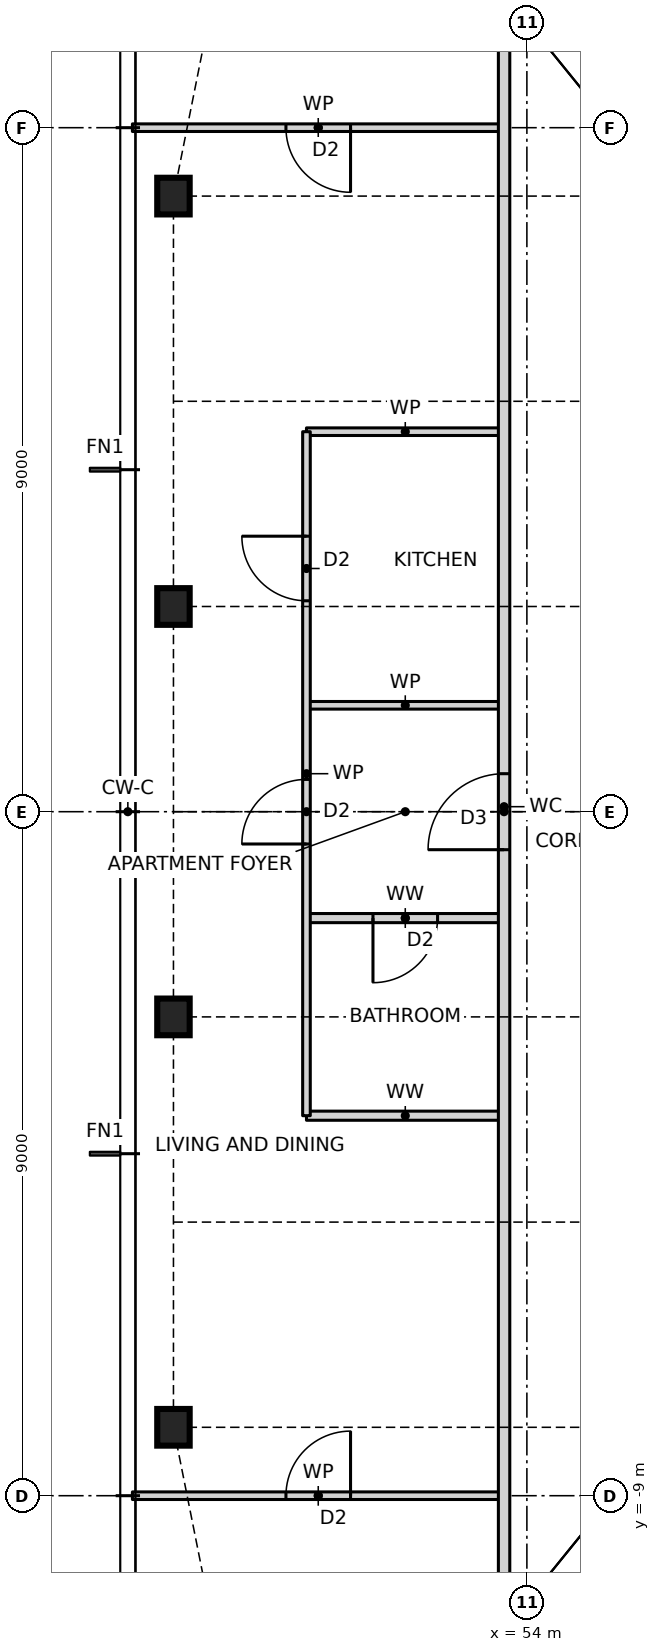
"""IFC4 building model, lengths in metres.
Left out: names, types, materials, properties, quantities, classifications, styles, units other than length and angle.
Written with IfcOpenShell. Run it as: python <this file> out.ifc"""

import sys

from ifc_helpers import new_model, si_unit, direction, frame, frame_2d, origin, origin_2d, place, context, subcontext, project, spatial, rectangle, i_section, extrude, element, fill, save


model = new_model("IFC4")
c1 = context("Model", 3, precision=1e-05, world=origin(), true_north=direction((0.0, 1.0)))
c2 = subcontext(c1, "Body", "Model", "MODEL_VIEW")
j1 = project(units=[si_unit("LENGTHUNIT", "METRE"), si_unit("PLANEANGLEUNIT", "RADIAN")], contexts=[c1])
p1 = place(None, origin())
s1 = spatial("IfcSite", under=j1, at=p1, CompositionType="ELEMENT")
p2 = place(p1, origin())
s2 = spatial("IfcBuilding", under=s1, at=p2, CompositionType="ELEMENT")
p3 = place(p2, frame((0.0, 0.0, 105.0)))
s3 = spatial("IfcBuildingStorey", under=s2, at=p3, CompositionType="ELEMENT", Elevation=105.0)
for number, where, z_axis, x_axis in (
    (1, (49.35, 8.1, 0.0), (0.0, 0.0, 1.0), (1.0, 0.0, 0.0)),
    (2, (49.35, 2.7, 0.0), (0.0, 0.0, 1.0), (1.0, 0.0, 0.0)),
    (3, (49.35, -2.7, 0.0), (0.0, 0.0, 1.0), (1.0, 0.0, 0.0)),
    (4, (49.35, -8.1, 0.0), (0.0, 0.0, 1.0), (1.0, 0.0, 0.0)),
):
    element("IfcColumn", number, at=place(p3, frame(where, z_axis=z_axis, x_axis=x_axis)), inside=s3, PredefinedType="COLUMN", context=c2, shape_type="SweptSolid", body=[
        extrude(i_section(OverallWidth=0.427, OverallDepth=0.483, WebThickness=0.051, FlangeThickness=0.082, at=origin_2d()), origin(), (0.0, 0.0, 1.0), 3.5),
    ])
p4 = place(p3, frame((48.81, -9.0, 0.0), z_axis=(0.0, 0.0, 1.0), x_axis=(1.0, 0.0, 0.0)))
e5 = element("IfcWall", 5, at=p4, inside=s3, PredefinedType="PARTITIONING", context=c2, shape_type="SweptSolid", body=[
    extrude(rectangle(XDim=4.89, YDim=0.1, at=frame_2d((2.445, 0.0))), origin(), (0.0, 0.0, 1.0), 3.27),
])
p5 = place(p4, frame((2.02, 0.0, 0.0)))
e6 = element("IfcOpeningElement", 6, at=p5, cuts=e5, PredefinedType="OPENING", context=c2, shape_type="SweptSolid", body=[
    extrude(rectangle(XDim=0.85, YDim=2.1, at=frame_2d((0.425, 1.05))), frame((0.0, 0.06, 0.0), z_axis=(0.0, -1.0, 0.0), x_axis=(1.0, 0.0, 0.0)), (0.0, 0.0, 1.0), 0.12),
])
p6 = place(p3, frame((51.1, -4.0, 0.0), z_axis=(0.0, 0.0, 1.0), x_axis=(1.0, 0.0, 0.0)))
e7 = element("IfcWall", 7, at=p6, inside=s3, PredefinedType="PARTITIONING", context=c2, shape_type="SweptSolid", body=[
    extrude(rectangle(XDim=2.6, YDim=0.12, at=frame_2d((1.3, 0.0))), origin(), (0.0, 0.0, 1.0), 3.27),
])
p7 = place(p3, frame((51.1, -1.4, 0.0), z_axis=(0.0, 0.0, 1.0), x_axis=(1.0, 0.0, 0.0)))
e8 = element("IfcWall", 8, at=p7, inside=s3, PredefinedType="PARTITIONING", context=c2, shape_type="SweptSolid", body=[
    extrude(rectangle(XDim=2.6, YDim=0.12, at=frame_2d((1.3, 0.0))), origin(), (0.0, 0.0, 1.0), 3.27),
])
p8 = place(p7, frame((0.875, 0.0, 0.0)))
e9 = element("IfcOpeningElement", 9, at=p8, cuts=e8, PredefinedType="OPENING", context=c2, shape_type="SweptSolid", body=[
    extrude(rectangle(XDim=0.85, YDim=2.1, at=frame_2d((0.425, 1.05))), frame((0.0, 0.07, 0.0), z_axis=(0.0, -1.0, 0.0), x_axis=(1.0, 0.0, 0.0)), (0.0, 0.0, 1.0), 0.14),
])
for number, where, z_axis, x_axis in (
    (10, (51.1, 1.4, 0.0), (0.0, 0.0, 1.0), (1.0, 0.0, 0.0)),
    (11, (51.1, 5.0, 0.0), (0.0, 0.0, 1.0), (1.0, 0.0, 0.0)),
):
    element("IfcWall", number, at=place(p3, frame(where, z_axis=z_axis, x_axis=x_axis)), inside=s3, PredefinedType="PARTITIONING", context=c2, shape_type="SweptSolid", body=[
        extrude(rectangle(XDim=2.6, YDim=0.1, at=frame_2d((1.3, 0.0))), origin(), (0.0, 0.0, 1.0), 3.27),
    ])
p9 = place(p3, frame((48.81, 9.0, 0.0), z_axis=(0.0, 0.0, 1.0), x_axis=(1.0, 0.0, 0.0)))
e12 = element("IfcWall", 12, at=p9, inside=s3, PredefinedType="PARTITIONING", context=c2, shape_type="SweptSolid", body=[
    extrude(rectangle(XDim=4.89, YDim=0.1, at=frame_2d((2.445, 0.0))), origin(), (0.0, 0.0, 1.0), 3.27),
])
p10 = place(p9, frame((2.02, 0.0, 0.0)))
e13 = element("IfcOpeningElement", 13, at=p10, cuts=e12, PredefinedType="OPENING", context=c2, shape_type="SweptSolid", body=[
    extrude(rectangle(XDim=0.85, YDim=2.1, at=frame_2d((0.425, 1.05))), frame((0.0, 0.06, 0.0), z_axis=(0.0, -1.0, 0.0), x_axis=(1.0, 0.0, 0.0)), (0.0, 0.0, 1.0), 0.12),
])
p11 = place(p3, frame((53.7, -10.768, 0.0), z_axis=(0.0, 0.0, 1.0), x_axis=(0.0, 1.0, 0.0)))
e14 = element("IfcWall", 14, at=p11, inside=s3, PredefinedType="PARTITIONING", context=c2, shape_type="SweptSolid", body=[
    extrude(rectangle(XDim=21.668, YDim=0.15, at=frame_2d((10.834, 0.0))), origin(), (0.0, 0.0, 1.0), 3.27),
])
p12 = place(p11, frame((10.268, 0.0, 0.0)))
e15 = element("IfcOpeningElement", 15, at=p12, cuts=e14, PredefinedType="OPENING", context=c2, shape_type="SweptSolid", body=[
    extrude(rectangle(XDim=1.0, YDim=2.1, at=frame_2d((0.5, 1.05))), frame((0.0, 0.085, 0.0), z_axis=(0.0, -1.0, 0.0), x_axis=(1.0, 0.0, 0.0)), (0.0, 0.0, 1.0), 0.17),
])
p13 = place(p3, frame((51.1, -4.0, 0.0), z_axis=(0.0, 0.0, 1.0), x_axis=(0.0, 1.0, 0.0)))
e16 = element("IfcWall", 16, at=p13, inside=s3, PredefinedType="PARTITIONING", context=c2, shape_type="SweptSolid", body=[
    extrude(rectangle(XDim=9.0, YDim=0.1, at=frame_2d((4.5, 0.0))), origin(), (0.0, 0.0, 1.0), 3.27),
])
p14 = place(p13, frame((6.775, 0.0, 0.0)))
e17 = element("IfcOpeningElement", 17, at=p14, cuts=e16, PredefinedType="OPENING", context=c2, shape_type="SweptSolid", body=[
    extrude(rectangle(XDim=0.85, YDim=2.1, at=frame_2d((0.425, 1.05))), frame((0.0, 0.06, 0.0), z_axis=(0.0, -1.0, 0.0), x_axis=(1.0, 0.0, 0.0)), (0.0, 0.0, 1.0), 0.12),
])
p15 = place(p13, frame((3.575, 0.0, 0.0)))
e18 = element("IfcOpeningElement", 18, at=p15, cuts=e16, PredefinedType="OPENING", context=c2, shape_type="SweptSolid", body=[
    extrude(rectangle(XDim=0.85, YDim=2.1, at=frame_2d((0.425, 1.05))), frame((0.0, 0.06, 0.0), z_axis=(0.0, -1.0, 0.0), x_axis=(1.0, 0.0, 0.0)), (0.0, 0.0, 1.0), 0.12),
])
p16 = place(p14, origin())
e19 = element("IfcDoor", 19, at=p16, inside=s3, OperationType="SINGLE_SWING_RIGHT", PredefinedType="DOOR", context=c2, shape_type="SweptSolid", body=[
    extrude(rectangle(XDim=0.85, YDim=2.1, at=frame_2d((0.425, 1.05))), frame((0.0, 0.025, 0.0), z_axis=(0.0, -1.0, 0.0), x_axis=(1.0, 0.0, 0.0)), (0.0, 0.0, 1.0), 0.05),
])
fill(e17, e19)
p17 = place(p12, origin())
e20 = element("IfcDoor", 20, at=p17, inside=s3, OperationType="SINGLE_SWING_LEFT", PredefinedType="DOOR", context=c2, shape_type="SweptSolid", body=[
    extrude(rectangle(XDim=1.0, YDim=2.1, at=frame_2d((0.5, 1.05))), frame((0.0, 0.025, 0.0), z_axis=(0.0, -1.0, 0.0), x_axis=(1.0, 0.0, 0.0)), (0.0, 0.0, 1.0), 0.05),
])
fill(e15, e20)
p18 = place(p15, origin())
e21 = element("IfcDoor", 21, at=p18, inside=s3, OperationType="SINGLE_SWING_LEFT", PredefinedType="DOOR", context=c2, shape_type="SweptSolid", body=[
    extrude(rectangle(XDim=0.85, YDim=2.1, at=frame_2d((0.425, 1.05))), frame((0.0, 0.025, 0.0), z_axis=(0.0, -1.0, 0.0), x_axis=(1.0, 0.0, 0.0)), (0.0, 0.0, 1.0), 0.05),
])
fill(e18, e21)
p19 = place(p8, frame((0.85, 0.0, 0.0), z_axis=(0.0, 0.0, 1.0), x_axis=(-1.0, 0.0, 0.0)))
e22 = element("IfcDoor", 22, at=p19, inside=s3, OperationType="SINGLE_SWING_RIGHT", PredefinedType="DOOR", context=c2, shape_type="SweptSolid", body=[
    extrude(rectangle(XDim=0.85, YDim=2.1, at=frame_2d((0.425, 1.05))), frame((0.0, 0.025, 0.0), z_axis=(0.0, -1.0, 0.0), x_axis=(1.0, 0.0, 0.0)), (0.0, 0.0, 1.0), 0.05),
])
fill(e9, e22)
p20 = place(p10, frame((0.85, 0.0, 0.0), z_axis=(0.0, 0.0, 1.0), x_axis=(-1.0, 0.0, 0.0)))
e23 = element("IfcDoor", 23, at=p20, inside=s3, OperationType="SINGLE_SWING_LEFT", PredefinedType="DOOR", context=c2, shape_type="SweptSolid", body=[
    extrude(rectangle(XDim=0.85, YDim=2.1, at=frame_2d((0.425, 1.05))), frame((0.0, 0.025, 0.0), z_axis=(0.0, -1.0, 0.0), x_axis=(1.0, 0.0, 0.0)), (0.0, 0.0, 1.0), 0.05),
])
fill(e13, e23)
p21 = place(p5, origin())
e24 = element("IfcDoor", 24, at=p21, inside=s3, OperationType="SINGLE_SWING_RIGHT", PredefinedType="DOOR", context=c2, shape_type="SweptSolid", body=[
    extrude(rectangle(XDim=0.85, YDim=2.1, at=frame_2d((0.425, 1.05))), frame((0.0, 0.025, 0.0), z_axis=(0.0, -1.0, 0.0), x_axis=(1.0, 0.0, 0.0)), (0.0, 0.0, 1.0), 0.05),
])
fill(e6, e24)
save(model, sys.argv[1])
